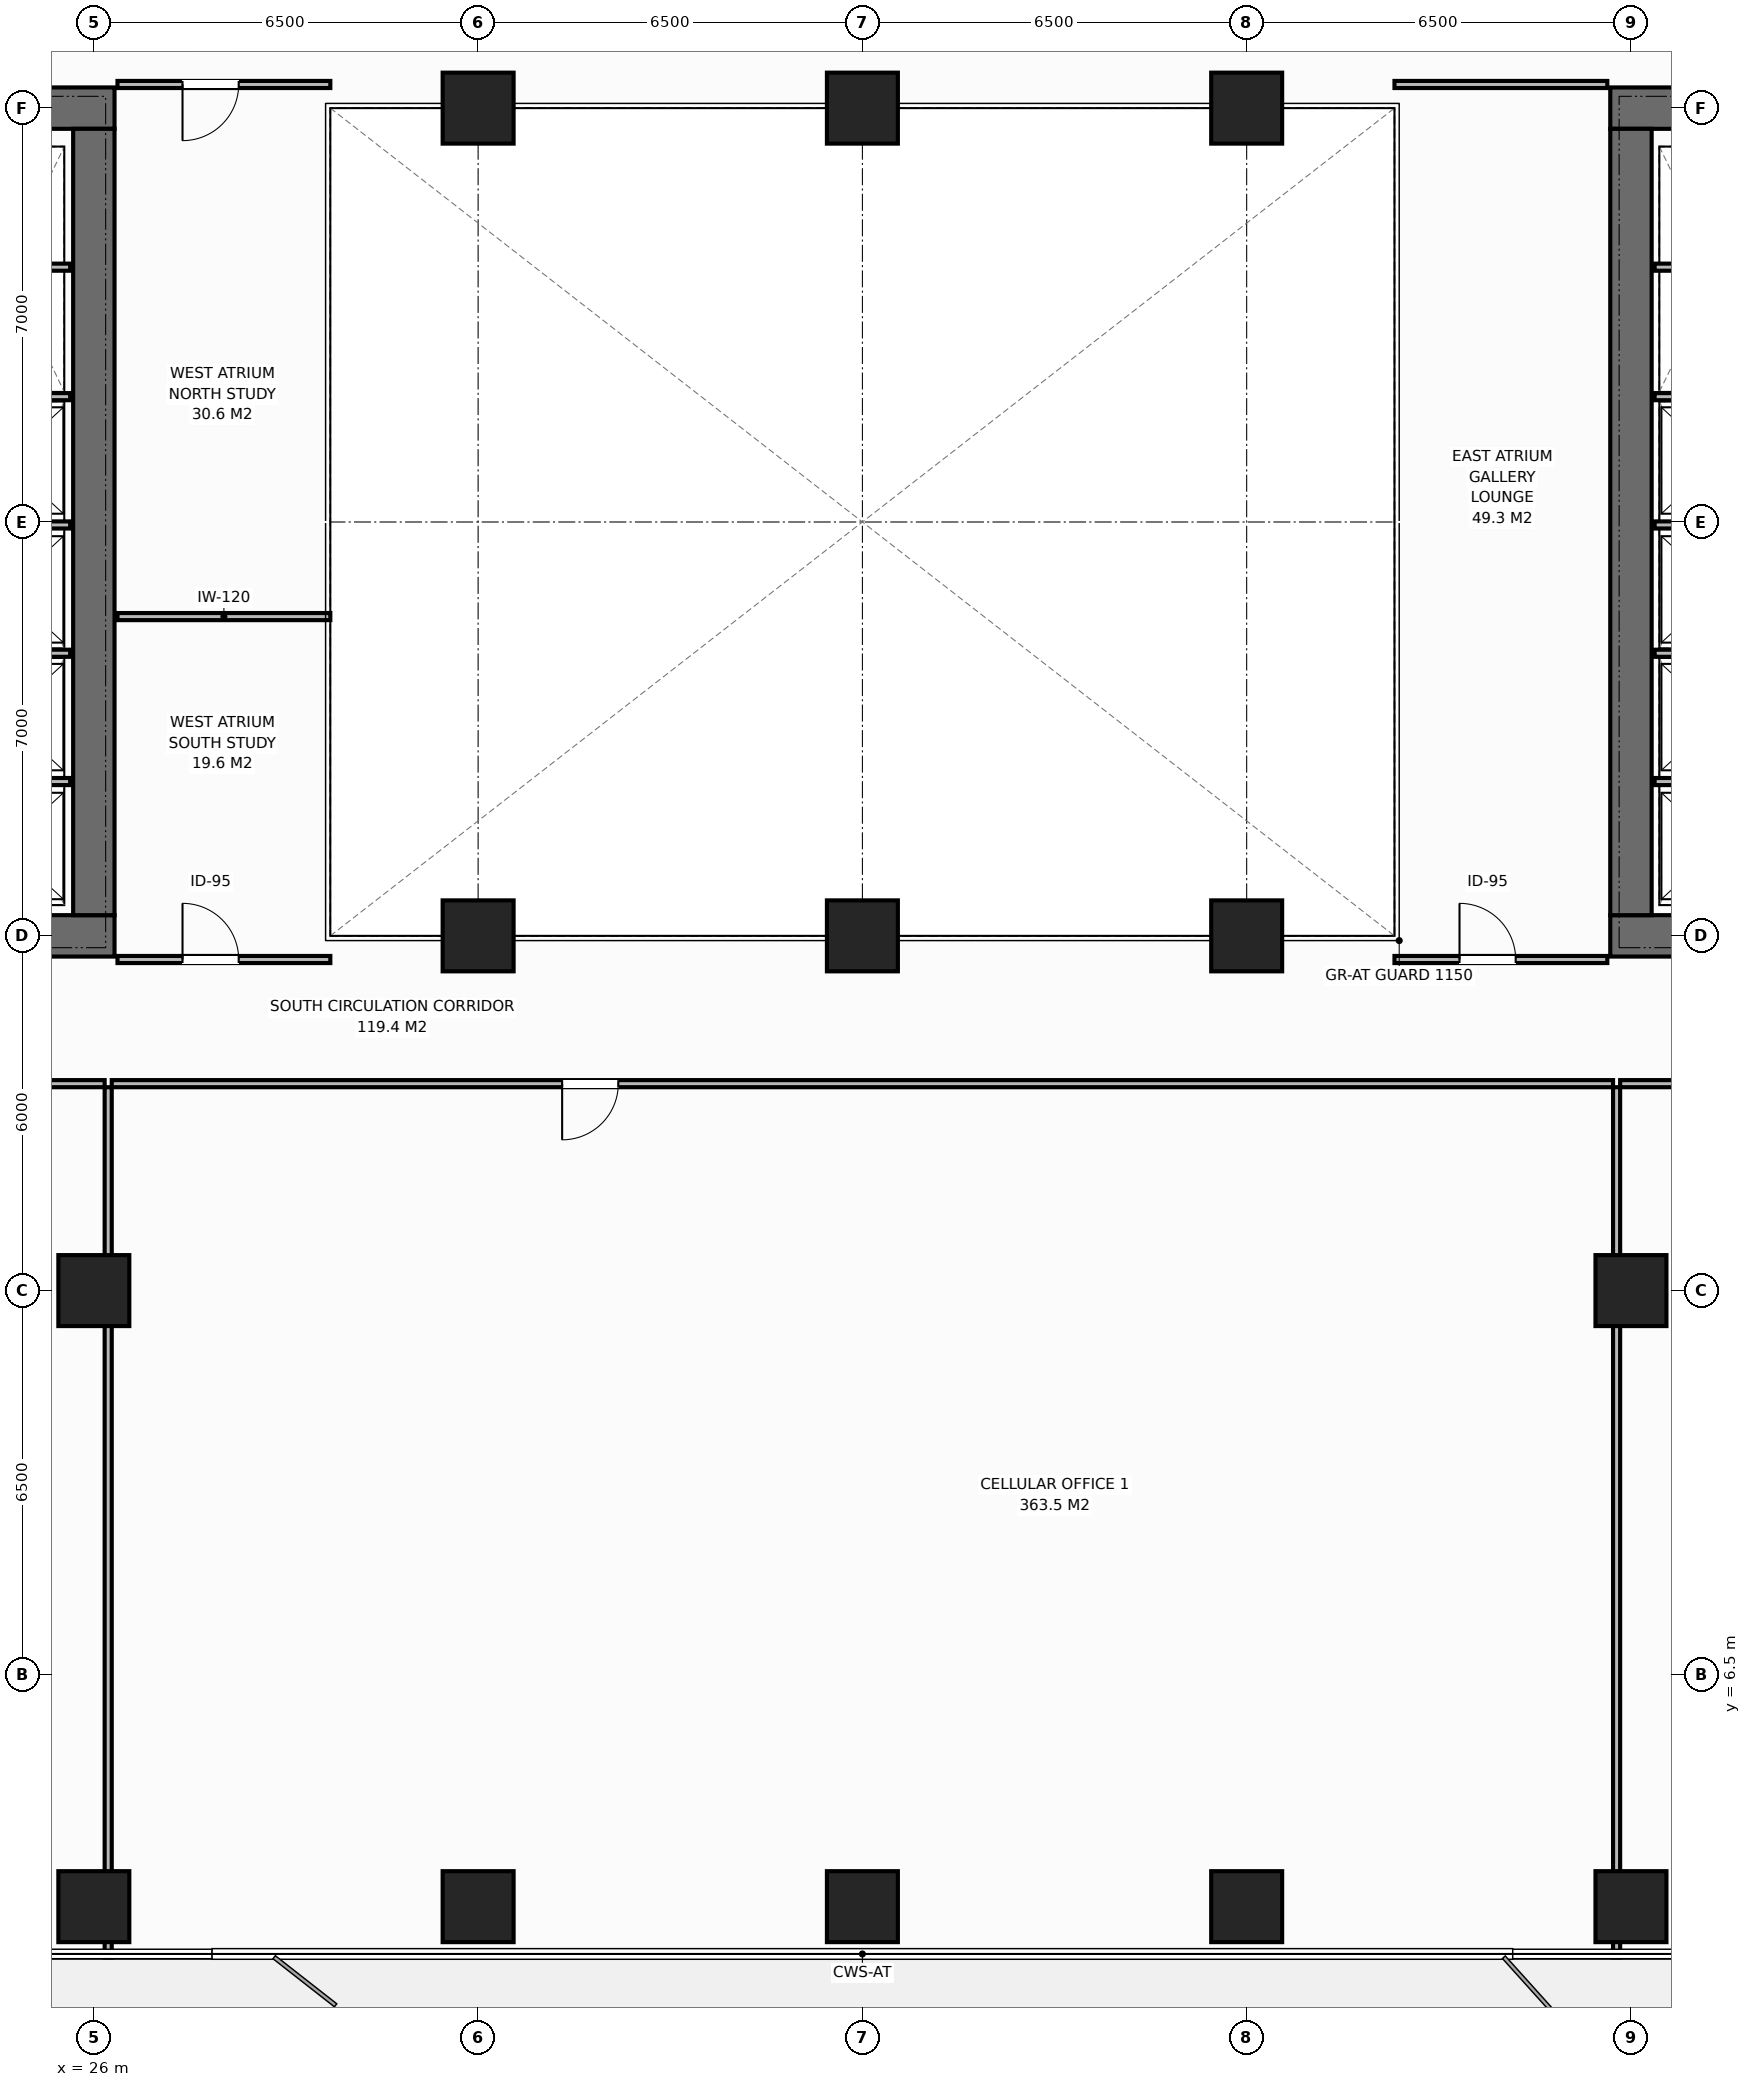
"""IFC4 building model, lengths in metres.
Left out: names, types, materials, properties, quantities, classifications, styles, units other than length and angle.
Written with IfcOpenShell. Run it as: python <this file> out.ifc"""

import sys

from ifc_helpers import new_model, si_unit, direction, frame, frame_2d, origin, origin_2d, place, context, subcontext, project, spatial, rectangle, extrude, element, fill, save


model = new_model("IFC4")
c1 = context("Model", 3, precision=1e-05, world=origin(), true_north=direction((0.0, 1.0)))
c2 = subcontext(c1, "Body", "Model", "MODEL_VIEW")
j1 = project(units=[si_unit("LENGTHUNIT", "METRE"), si_unit("PLANEANGLEUNIT", "RADIAN")], contexts=[c1])
p1 = place(None, origin())
s1 = spatial("IfcSite", under=j1, at=p1, CompositionType="ELEMENT")
p2 = place(p1, origin())
s2 = spatial("IfcBuilding", under=s1, at=p2, CompositionType="ELEMENT")
p3 = place(p2, frame((0.0, 0.0, 86.0)))
s3 = spatial("IfcBuildingStorey", under=s2, at=p3, CompositionType="ELEMENT", Elevation=86.0)
p4 = place(p3, frame((12.65, 19.0, 0.0), z_axis=(0.0, 0.0, 1.0), x_axis=(1.0, 0.0, 0.0)))
e1 = element("IfcWall", 1, at=p4, inside=s3, PredefinedType="SHEAR", context=c2, shape_type="SweptSolid", body=[
    extrude(rectangle(XDim=13.7, YDim=0.7, at=frame_2d((6.85, 0.0))), origin(), (0.0, 0.0, 1.0), 3.8),
])
p5 = place(p4, frame((9.23, 0.0, 0.0)))
e2 = element("IfcOpeningElement", 2, at=p5, cuts=e1, PredefinedType="OPENING", context=c2, shape_type="SweptSolid", body=[
    extrude(rectangle(XDim=1.4, YDim=2.2, at=frame_2d((0.7, 1.1))), frame((0.0, 0.36, 0.0), z_axis=(0.0, -1.0, 0.0), x_axis=(1.0, 0.0, 0.0)), (0.0, 0.0, 1.0), 0.72),
])
p6 = place(p3, frame((12.65, 33.0, 0.0), z_axis=(0.0, 0.0, 1.0), x_axis=(1.0, 0.0, 0.0)))
e3 = element("IfcWall", 3, at=p6, inside=s3, PredefinedType="SHEAR", context=c2, shape_type="SweptSolid", body=[
    extrude(rectangle(XDim=13.7, YDim=0.7, at=frame_2d((6.85, 0.0))), origin(), (0.0, 0.0, 1.0), 3.8),
])
p7 = place(p6, frame((1.25, 0.0, 0.0)))
e4 = element("IfcOpeningElement", 4, at=p7, cuts=e3, PredefinedType="OPENING", context=c2, shape_type="SweptSolid", body=[
    extrude(rectangle(XDim=0.9, YDim=2.15, at=frame_2d((0.45, 1.075))), frame((0.0, 0.36, 0.0), z_axis=(0.0, -1.0, 0.0), x_axis=(1.0, 0.0, 0.0)), (0.0, 0.0, 1.0), 0.72),
])
p8 = place(p6, frame((3.85, 0.0, 0.0)))
e5 = element("IfcOpeningElement", 5, at=p8, cuts=e3, PredefinedType="OPENING", context=c2, shape_type="SweptSolid", body=[
    extrude(rectangle(XDim=0.95, YDim=2.15, at=frame_2d((0.475, 1.075))), frame((0.0, 0.36, 0.0), z_axis=(0.0, -1.0, 0.0), x_axis=(1.0, 0.0, 0.0)), (0.0, 0.0, 1.0), 0.72),
])
p9 = place(p6, frame((6.85, 0.0, 0.0)))
e6 = element("IfcOpeningElement", 6, at=p9, cuts=e3, PredefinedType="OPENING", context=c2, shape_type="SweptSolid", body=[
    extrude(rectangle(XDim=0.95, YDim=2.15, at=frame_2d((0.475, 1.075))), frame((0.0, 0.36, 0.0), z_axis=(0.0, -1.0, 0.0), x_axis=(1.0, 0.0, 0.0)), (0.0, 0.0, 1.0), 0.72),
])
p10 = place(p6, frame((9.23, 0.0, 0.0)))
e7 = element("IfcOpeningElement", 7, at=p10, cuts=e3, PredefinedType="OPENING", context=c2, shape_type="SweptSolid", body=[
    extrude(rectangle(XDim=1.4, YDim=2.2, at=frame_2d((0.7, 1.1))), frame((0.0, 0.36, 0.0), z_axis=(0.0, -1.0, 0.0), x_axis=(1.0, 0.0, 0.0)), (0.0, 0.0, 1.0), 0.72),
])
p11 = place(p3, frame((26.0, 19.35, 0.0), z_axis=(0.0, 0.0, 1.0), x_axis=(0.0, 1.0, 0.0)))
e8 = element("IfcWall", 8, at=p11, inside=s3, PredefinedType="SHEAR", context=c2, shape_type="SweptSolid", body=[
    extrude(rectangle(XDim=13.3, YDim=0.7, at=frame_2d((6.65, 0.0))), origin(), (0.0, 0.0, 1.0), 3.8),
])
p12 = place(p3, frame((51.65, 19.0, 0.0), z_axis=(0.0, 0.0, 1.0), x_axis=(1.0, 0.0, 0.0)))
e9 = element("IfcWall", 9, at=p12, inside=s3, PredefinedType="SHEAR", context=c2, shape_type="SweptSolid", body=[
    extrude(rectangle(XDim=13.7, YDim=0.7, at=frame_2d((6.85, 0.0))), origin(), (0.0, 0.0, 1.0), 3.8),
])
p13 = place(p12, frame((3.07, 0.0, 0.0)))
e10 = element("IfcOpeningElement", 10, at=p13, cuts=e9, PredefinedType="OPENING", context=c2, shape_type="SweptSolid", body=[
    extrude(rectangle(XDim=1.4, YDim=2.2, at=frame_2d((0.7, 1.1))), frame((0.0, 0.36, 0.0), z_axis=(0.0, -1.0, 0.0), x_axis=(1.0, 0.0, 0.0)), (0.0, 0.0, 1.0), 0.72),
])
p14 = place(p3, frame((51.65, 33.0, 0.0), z_axis=(0.0, 0.0, 1.0), x_axis=(1.0, 0.0, 0.0)))
e11 = element("IfcWall", 11, at=p14, inside=s3, PredefinedType="SHEAR", context=c2, shape_type="SweptSolid", body=[
    extrude(rectangle(XDim=13.7, YDim=0.7, at=frame_2d((6.85, 0.0))), origin(), (0.0, 0.0, 1.0), 3.8),
])
p15 = place(p14, frame((3.07, 0.0, 0.0)))
e12 = element("IfcOpeningElement", 12, at=p15, cuts=e11, PredefinedType="OPENING", context=c2, shape_type="SweptSolid", body=[
    extrude(rectangle(XDim=1.4, YDim=2.2, at=frame_2d((0.7, 1.1))), frame((0.0, 0.36, 0.0), z_axis=(0.0, -1.0, 0.0), x_axis=(1.0, 0.0, 0.0)), (0.0, 0.0, 1.0), 0.72),
])
p16 = place(p14, frame((10.95, 0.0, 0.0)))
e13 = element("IfcOpeningElement", 13, at=p16, cuts=e11, PredefinedType="OPENING", context=c2, shape_type="SweptSolid", body=[
    extrude(rectangle(XDim=0.9, YDim=2.15, at=frame_2d((0.45, 1.075))), frame((0.0, 0.36, 0.0), z_axis=(0.0, -1.0, 0.0), x_axis=(1.0, 0.0, 0.0)), (0.0, 0.0, 1.0), 0.72),
])
p17 = place(p14, frame((6.35, 0.0, 0.0)))
e14 = element("IfcOpeningElement", 14, at=p17, cuts=e11, PredefinedType="OPENING", context=c2, shape_type="SweptSolid", body=[
    extrude(rectangle(XDim=0.95, YDim=2.15, at=frame_2d((0.475, 1.075))), frame((0.0, 0.36, 0.0), z_axis=(0.0, -1.0, 0.0), x_axis=(1.0, 0.0, 0.0)), (0.0, 0.0, 1.0), 0.72),
])
p18 = place(p14, frame((8.8, 0.0, 0.0)))
e15 = element("IfcOpeningElement", 15, at=p18, cuts=e11, PredefinedType="OPENING", context=c2, shape_type="SweptSolid", body=[
    extrude(rectangle(XDim=0.9, YDim=2.15, at=frame_2d((0.45, 1.075))), frame((0.0, 0.36, 0.0), z_axis=(0.0, -1.0, 0.0), x_axis=(1.0, 0.0, 0.0)), (0.0, 0.0, 1.0), 0.72),
])
p19 = place(p3, frame((52.0, 19.35, 0.0), z_axis=(0.0, 0.0, 1.0), x_axis=(0.0, 1.0, 0.0)))
e16 = element("IfcWall", 16, at=p19, inside=s3, PredefinedType="SHEAR", context=c2, shape_type="SweptSolid", body=[
    extrude(rectangle(XDim=13.3, YDim=0.7, at=frame_2d((6.65, 0.0))), origin(), (0.0, 0.0, 1.0), 3.8),
])
for number, where, z_axis, x_axis in (
    (17, (32.5, 19.0, 0.0), (0.0, 0.0, 1.0), (1.0, 0.0, 0.0)),
    (18, (32.5, 33.0, 0.0), (0.0, 0.0, 1.0), (1.0, 0.0, 0.0)),
    (19, (39.0, 19.0, 0.0), (0.0, 0.0, 1.0), (1.0, 0.0, 0.0)),
    (20, (39.0, 33.0, 0.0), (0.0, 0.0, 1.0), (1.0, 0.0, 0.0)),
    (21, (45.5, 19.0, 0.0), (0.0, 0.0, 1.0), (1.0, 0.0, 0.0)),
    (22, (45.5, 33.0, 0.0), (0.0, 0.0, 1.0), (1.0, 0.0, 0.0)),
    (23, (26.0, 13.0, 0.0), (0.0, 0.0, 1.0), (1.0, 0.0, 0.0)),
    (24, (52.0, 13.0, 0.0), (0.0, 0.0, 1.0), (1.0, 0.0, 0.0)),
    (25, (26.0, 2.58, 0.0), (0.0, 0.0, 1.0), (1.0, 0.0, 0.0)),
    (26, (32.5, 2.58, 0.0), (0.0, 0.0, 1.0), (1.0, 0.0, 0.0)),
    (27, (39.0, 2.58, 0.0), (0.0, 0.0, 1.0), (1.0, 0.0, 0.0)),
    (28, (45.5, 2.58, 0.0), (0.0, 0.0, 1.0), (1.0, 0.0, 0.0)),
    (29, (52.0, 2.58, 0.0), (0.0, 0.0, 1.0), (1.0, 0.0, 0.0)),
):
    element("IfcColumn", number, at=place(p3, frame(where, z_axis=z_axis, x_axis=x_axis)), inside=s3, PredefinedType="COLUMN", context=c2, shape_type="SweptSolid", body=[
        extrude(rectangle(XDim=1.2, YDim=1.2, at=origin_2d()), origin(), (0.0, 0.0, 1.0), 3.8),
    ])
for number, where, z_axis, x_axis in (
    (30, (23.4, 21.61, 0.0), (0.0, 0.0, 1.0), (1.0, 0.0, 0.0)),
    (31, (23.4, 23.78, 0.0), (0.0, 0.0, 1.0), (1.0, 0.0, 0.0)),
    (32, (23.4, 25.95, 0.0), (0.0, 0.0, 1.0), (1.0, 0.0, 0.0)),
    (33, (23.4, 28.12, 0.0), (0.0, 0.0, 1.0), (1.0, 0.0, 0.0)),
    (34, (23.4, 30.31, 0.0), (0.0, 0.0, 1.0), (1.0, 0.0, 0.0)),
    (35, (52.4, 21.61, 0.0), (0.0, 0.0, 1.0), (1.0, 0.0, 0.0)),
    (36, (52.4, 23.78, 0.0), (0.0, 0.0, 1.0), (1.0, 0.0, 0.0)),
    (37, (52.4, 25.95, 0.0), (0.0, 0.0, 1.0), (1.0, 0.0, 0.0)),
    (38, (52.4, 28.12, 0.0), (0.0, 0.0, 1.0), (1.0, 0.0, 0.0)),
    (39, (52.4, 30.31, 0.0), (0.0, 0.0, 1.0), (1.0, 0.0, 0.0)),
):
    element("IfcWall", number, at=place(p3, frame(where, z_axis=z_axis, x_axis=x_axis)), inside=s3, PredefinedType="PARTITIONING", context=c2, shape_type="SweptSolid", body=[
        extrude(rectangle(XDim=2.2, YDim=0.12, at=frame_2d((1.1, 0.0))), origin(), (0.0, 0.0, 1.0), 3.565),
    ])
p20 = place(p3, frame((26.4, 24.4, 0.0), z_axis=(0.0, 0.0, 1.0), x_axis=(1.0, 0.0, 0.0)))
e40 = element("IfcWall", 40, at=p20, inside=s3, PredefinedType="PARTITIONING", context=c2, shape_type="SweptSolid", body=[
    extrude(rectangle(XDim=3.6, YDim=0.12, at=frame_2d((1.8, 0.0))), origin(), (0.0, 0.0, 1.0), 3.565),
])
p21 = place(p3, frame((26.4, 18.6, 0.0), z_axis=(0.0, 0.0, 1.0), x_axis=(1.0, 0.0, 0.0)))
e41 = element("IfcWall", 41, at=p21, inside=s3, PredefinedType="PARTITIONING", context=c2, shape_type="SweptSolid", body=[
    extrude(rectangle(XDim=3.6, YDim=0.12, at=frame_2d((1.8, 0.0))), origin(), (0.0, 0.0, 1.0), 3.565),
])
p22 = place(p21, frame((1.1, 0.0, 0.0)))
e42 = element("IfcOpeningElement", 42, at=p22, cuts=e41, PredefinedType="OPENING", context=c2, shape_type="SweptSolid", body=[
    extrude(rectangle(XDim=0.95, YDim=2.15, at=frame_2d((0.475, 1.075))), frame((0.0, 0.07, 0.0), z_axis=(0.0, -1.0, 0.0), x_axis=(1.0, 0.0, 0.0)), (0.0, 0.0, 1.0), 0.14),
])
p23 = place(p3, frame((26.4, 33.4, 0.0), z_axis=(0.0, 0.0, 1.0), x_axis=(1.0, 0.0, 0.0)))
e43 = element("IfcWall", 43, at=p23, inside=s3, PredefinedType="PARTITIONING", context=c2, shape_type="SweptSolid", body=[
    extrude(rectangle(XDim=3.6, YDim=0.12, at=frame_2d((1.8, 0.0))), origin(), (0.0, 0.0, 1.0), 3.565),
])
p24 = place(p23, frame((1.1, 0.0, 0.0)))
e44 = element("IfcOpeningElement", 44, at=p24, cuts=e43, PredefinedType="OPENING", context=c2, shape_type="SweptSolid", body=[
    extrude(rectangle(XDim=0.95, YDim=2.15, at=frame_2d((0.475, 1.075))), frame((0.0, 0.07, 0.0), z_axis=(0.0, -1.0, 0.0), x_axis=(1.0, 0.0, 0.0)), (0.0, 0.0, 1.0), 0.14),
])
p25 = place(p3, frame((48.0, 33.4, 0.0), z_axis=(0.0, 0.0, 1.0), x_axis=(1.0, 0.0, 0.0)))
e45 = element("IfcWall", 45, at=p25, inside=s3, PredefinedType="PARTITIONING", context=c2, shape_type="SweptSolid", body=[
    extrude(rectangle(XDim=3.6, YDim=0.12, at=frame_2d((1.8, 0.0))), origin(), (0.0, 0.0, 1.0), 3.565),
])
p26 = place(p3, frame((48.0, 18.6, 0.0), z_axis=(0.0, 0.0, 1.0), x_axis=(1.0, 0.0, 0.0)))
e46 = element("IfcWall", 46, at=p26, inside=s3, PredefinedType="PARTITIONING", context=c2, shape_type="SweptSolid", body=[
    extrude(rectangle(XDim=3.6, YDim=0.12, at=frame_2d((1.8, 0.0))), origin(), (0.0, 0.0, 1.0), 3.565),
])
p27 = place(p26, frame((1.1, 0.0, 0.0)))
e47 = element("IfcOpeningElement", 47, at=p27, cuts=e46, PredefinedType="OPENING", context=c2, shape_type="SweptSolid", body=[
    extrude(rectangle(XDim=0.95, YDim=2.15, at=frame_2d((0.475, 1.075))), frame((0.0, 0.07, 0.0), z_axis=(0.0, -1.0, 0.0), x_axis=(1.0, 0.0, 0.0)), (0.0, 0.0, 1.0), 0.14),
])
p28 = place(p3, frame((26.243, 1.72, 0.0), z_axis=(0.0, 0.0, 1.0), x_axis=(0.0, 1.0, 0.0)))
e48 = element("IfcWall", 48, at=p28, inside=s3, PredefinedType="PARTITIONING", context=c2, shape_type="SweptSolid", body=[
    extrude(rectangle(XDim=14.72, YDim=0.12, at=frame_2d((7.36, 0.0))), origin(), (0.0, 0.0, 1.0), 3.565),
])
p29 = place(p3, frame((1.98, 16.5, 0.0), z_axis=(0.0, 0.0, 1.0), x_axis=(1.0, 0.0, 0.0)))
e49 = element("IfcWall", 49, at=p29, inside=s3, PredefinedType="PARTITIONING", context=c2, shape_type="SweptSolid", body=[
    extrude(rectangle(XDim=24.203, YDim=0.12, at=frame_2d((12.102, 0.0))), origin(), (0.0, 0.0, 1.0), 3.565),
])
p30 = place(p29, frame((8.9, 0.0, 0.0)))
e50 = element("IfcOpeningElement", 50, at=p30, cuts=e49, PredefinedType="OPENING", context=c2, shape_type="SweptSolid", body=[
    extrude(rectangle(XDim=0.95, YDim=2.15, at=frame_2d((0.475, 1.075))), frame((0.0, 0.07, 0.0), z_axis=(0.0, -1.0, 0.0), x_axis=(1.0, 0.0, 0.0)), (0.0, 0.0, 1.0), 0.14),
])
p31 = place(p3, frame((51.757, 1.72, 0.0), z_axis=(0.0, 0.0, 1.0), x_axis=(0.0, 1.0, 0.0)))
e51 = element("IfcWall", 51, at=p31, inside=s3, PredefinedType="PARTITIONING", context=c2, shape_type="SweptSolid", body=[
    extrude(rectangle(XDim=14.72, YDim=0.12, at=frame_2d((7.36, 0.0))), origin(), (0.0, 0.0, 1.0), 3.565),
])
p32 = place(p3, frame((26.303, 16.5, 0.0), z_axis=(0.0, 0.0, 1.0), x_axis=(1.0, 0.0, 0.0)))
e52 = element("IfcWall", 52, at=p32, inside=s3, PredefinedType="PARTITIONING", context=c2, shape_type="SweptSolid", body=[
    extrude(rectangle(XDim=25.394, YDim=0.12, at=frame_2d((12.697, 0.0))), origin(), (0.0, 0.0, 1.0), 3.565),
])
p33 = place(p32, frame((7.618, 0.0, 0.0)))
e53 = element("IfcOpeningElement", 53, at=p33, cuts=e52, PredefinedType="OPENING", context=c2, shape_type="SweptSolid", body=[
    extrude(rectangle(XDim=0.95, YDim=2.15, at=frame_2d((0.475, 1.075))), frame((0.0, 0.07, 0.0), z_axis=(0.0, -1.0, 0.0), x_axis=(1.0, 0.0, 0.0)), (0.0, 0.0, 1.0), 0.14),
])
p34 = place(p3, frame((51.817, 16.5, 0.0), z_axis=(0.0, 0.0, 1.0), x_axis=(1.0, 0.0, 0.0)))
e54 = element("IfcWall", 54, at=p34, inside=s3, PredefinedType="PARTITIONING", context=c2, shape_type="SweptSolid", body=[
    extrude(rectangle(XDim=24.203, YDim=0.12, at=frame_2d((12.102, 0.0))), origin(), (0.0, 0.0, 1.0), 3.565),
])
p35 = place(p34, frame((14.353, 0.0, 0.0)))
e55 = element("IfcOpeningElement", 55, at=p35, cuts=e54, PredefinedType="OPENING", context=c2, shape_type="SweptSolid", body=[
    extrude(rectangle(XDim=0.95, YDim=2.15, at=frame_2d((0.475, 1.075))), frame((0.0, 0.07, 0.0), z_axis=(0.0, -1.0, 0.0), x_axis=(1.0, 0.0, 0.0)), (0.0, 0.0, 1.0), 0.14),
])
p36 = place(p22, origin())
e56 = element("IfcDoor", 56, at=p36, inside=s3, OperationType="SINGLE_SWING_LEFT", PredefinedType="DOOR", context=c2, shape_type="SweptSolid", body=[
    extrude(rectangle(XDim=0.95, YDim=2.15, at=frame_2d((0.475, 1.075))), frame((0.0, 0.025, 0.0), z_axis=(0.0, -1.0, 0.0), x_axis=(1.0, 0.0, 0.0)), (0.0, 0.0, 1.0), 0.05),
])
fill(e42, e56)
p37 = place(p24, origin())
e57 = element("IfcDoor", 57, at=p37, inside=s3, OperationType="SINGLE_SWING_RIGHT", PredefinedType="DOOR", context=c2, shape_type="SweptSolid", body=[
    extrude(rectangle(XDim=0.95, YDim=2.15, at=frame_2d((0.475, 1.075))), frame((0.0, 0.025, 0.0), z_axis=(0.0, -1.0, 0.0), x_axis=(1.0, 0.0, 0.0)), (0.0, 0.0, 1.0), 0.05),
])
fill(e44, e57)
p38 = place(p27, origin())
e58 = element("IfcDoor", 58, at=p38, inside=s3, OperationType="SINGLE_SWING_LEFT", PredefinedType="DOOR", context=c2, shape_type="SweptSolid", body=[
    extrude(rectangle(XDim=0.95, YDim=2.15, at=frame_2d((0.475, 1.075))), frame((0.0, 0.025, 0.0), z_axis=(0.0, -1.0, 0.0), x_axis=(1.0, 0.0, 0.0)), (0.0, 0.0, 1.0), 0.05),
])
fill(e47, e58)
p39 = place(p33, origin())
e59 = element("IfcDoor", 59, at=p39, inside=s3, OperationType="SINGLE_SWING_RIGHT", PredefinedType="DOOR", context=c2, shape_type="SweptSolid", body=[
    extrude(rectangle(XDim=0.95, YDim=2.15, at=frame_2d((0.475, 1.075))), frame((0.0, 0.025, 0.0), z_axis=(0.0, -1.0, 0.0), x_axis=(1.0, 0.0, 0.0)), (0.0, 0.0, 1.0), 0.05),
])
fill(e53, e59)
save(model, sys.argv[1])
